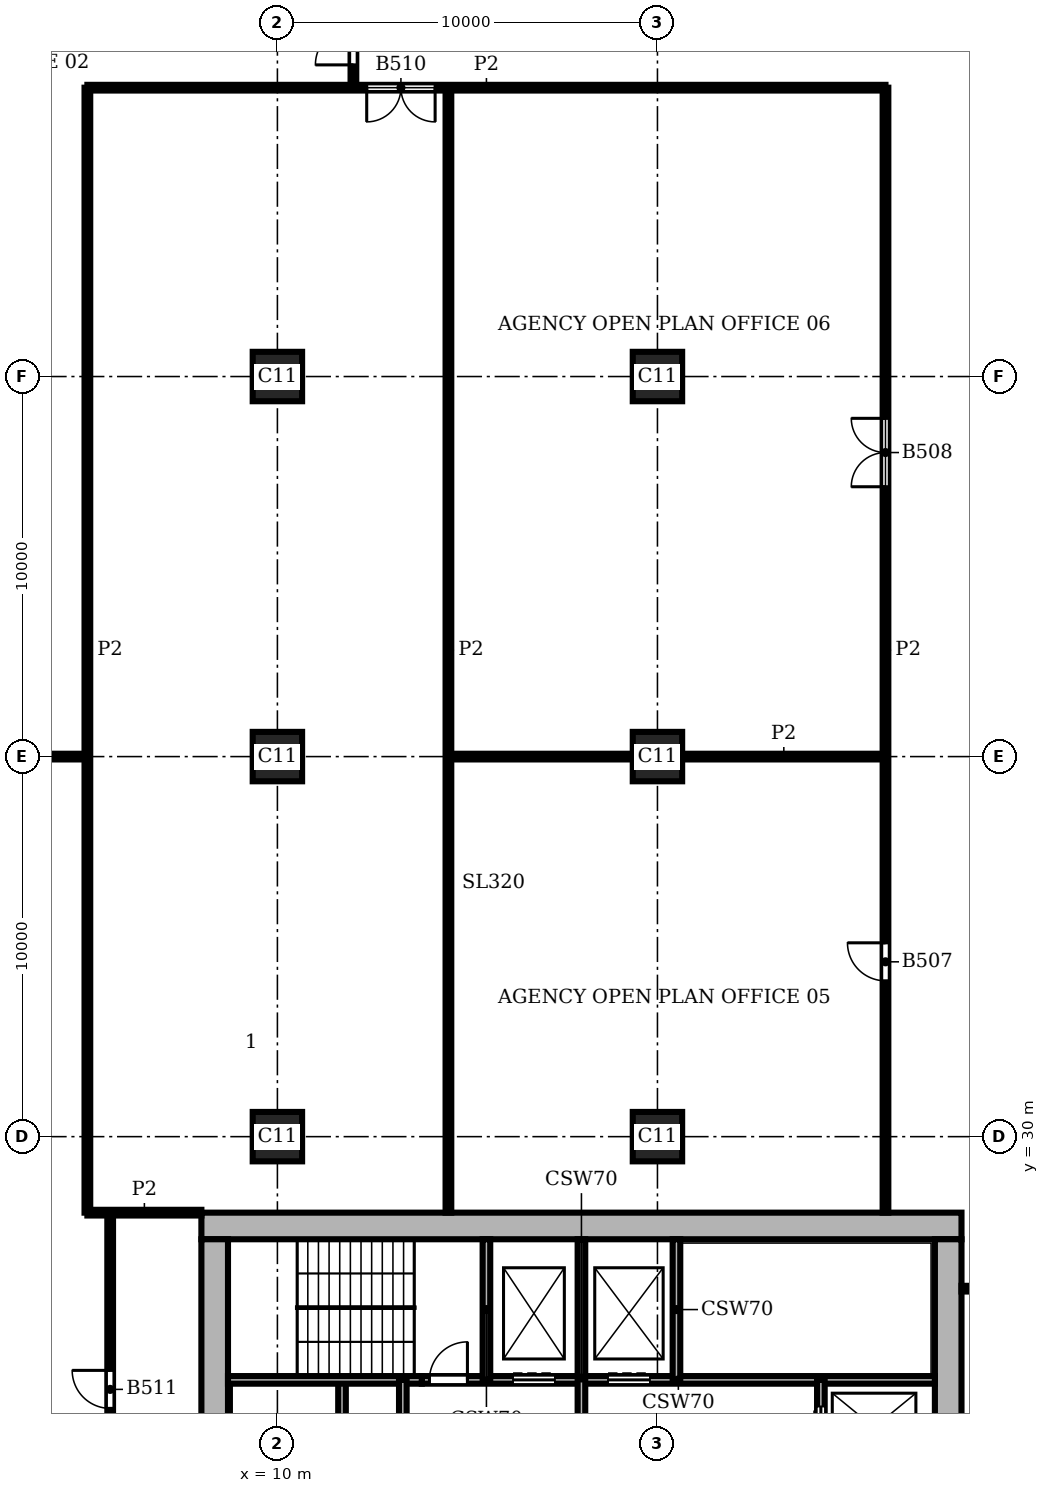
"""IFC4 building model, lengths in metres.
Left out: names, types, materials, properties, quantities, classifications, styles, units other than length and angle.
Written with IfcOpenShell. Run it as: python <this file> out.ifc"""

import sys

from ifc_helpers import new_model, si_unit, direction, frame, frame_2d, origin, origin_2d, place, context, subcontext, project, spatial, rectangle, extrude, element, fill, save


model = new_model("IFC4")
c1 = context("Model", 3, precision=1e-05, world=origin(), true_north=direction((0.0, 1.0)))
c2 = subcontext(c1, "Body", "Model", "MODEL_VIEW")
j1 = project(units=[si_unit("LENGTHUNIT", "METRE"), si_unit("PLANEANGLEUNIT", "RADIAN")], contexts=[c1])
p1 = place(None, origin())
s1 = spatial("IfcSite", under=j1, at=p1, CompositionType="ELEMENT")
p2 = place(p1, origin())
s2 = spatial("IfcBuilding", under=s1, at=p2, CompositionType="ELEMENT")
p3 = place(p2, frame((0.0, 0.0, 178.5)))
s3 = spatial("IfcBuildingStorey", under=s2, at=p3, CompositionType="ELEMENT", Elevation=178.5)
for number, where, z_axis, x_axis in (
    (1, (10.0, 30.0, 0.0), (0.0, 0.0, 1.0), (1.0, 0.0, 0.0)),
    (2, (10.0, 40.0, 0.0), (0.0, 0.0, 1.0), (1.0, 0.0, 0.0)),
    (3, (10.0, 50.0, 0.0), (0.0, 0.0, 1.0), (1.0, 0.0, 0.0)),
    (4, (20.0, 30.0, 0.0), (0.0, 0.0, 1.0), (1.0, 0.0, 0.0)),
    (5, (20.0, 40.0, 0.0), (0.0, 0.0, 1.0), (1.0, 0.0, 0.0)),
    (6, (20.0, 50.0, 0.0), (0.0, 0.0, 1.0), (1.0, 0.0, 0.0)),
):
    element("IfcColumn", number, at=place(p3, frame(where, z_axis=z_axis, x_axis=x_axis)), inside=s3, PredefinedType="COLUMN", context=c2, shape_type="SweptSolid", body=[
        extrude(rectangle(XDim=1.3, YDim=1.3, at=origin_2d()), origin(), (0.0, 0.0, 1.0), 3.9),
    ])
p4 = place(p3, frame((27.65, 8.7, 0.0), z_axis=(0.0, 0.0, 1.0), x_axis=(0.0, 1.0, 0.0)))
e7 = element("IfcWall", 7, at=p4, inside=s3, PredefinedType="SHEAR", context=c2, shape_type="SweptSolid", body=[
    extrude(rectangle(XDim=18.6, YDim=0.7, at=frame_2d((9.3, 0.0))), origin(), (0.0, 0.0, 1.0), 3.9),
])
p5 = place(p4, frame((4.75, 0.0, 0.0)))
e8 = element("IfcOpeningElement", 8, at=p5, cuts=e7, PredefinedType="OPENING", context=c2, shape_type="SweptSolid", body=[
    extrude(rectangle(XDim=1.6, YDim=2.1, at=frame_2d((0.8, 1.05))), frame((0.0, 0.36, 0.0), z_axis=(0.0, -1.0, 0.0), x_axis=(1.0, 0.0, 0.0)), (0.0, 0.0, 1.0), 0.72),
])
p6 = place(p3, frame((28.0, 27.65, 0.0), z_axis=(0.0, 0.0, 1.0), x_axis=(-1.0, 0.0, 0.0)))
e9 = element("IfcWall", 9, at=p6, inside=s3, PredefinedType="SHEAR", context=c2, shape_type="SweptSolid", body=[
    extrude(rectangle(XDim=20.0, YDim=0.7, at=frame_2d((10.0, 0.0))), origin(), (0.0, 0.0, 1.0), 3.9),
])
p7 = place(p3, frame((8.35, 27.3, 0.0), z_axis=(0.0, 0.0, 1.0), x_axis=(0.0, -1.0, 0.0)))
e10 = element("IfcWall", 10, at=p7, inside=s3, PredefinedType="SHEAR", context=c2, shape_type="SweptSolid", body=[
    extrude(rectangle(XDim=18.6, YDim=0.7, at=frame_2d((9.3, 0.0))), origin(), (0.0, 0.0, 1.0), 3.9),
])
p8 = place(p3, frame((8.7, 23.6, 0.0), z_axis=(0.0, 0.0, 1.0), x_axis=(1.0, 0.0, 0.0)))
e11 = element("IfcWall", 11, at=p8, inside=s3, PredefinedType="SHEAR", context=c2, shape_type="SweptSolid", body=[
    extrude(rectangle(XDim=5.1, YDim=0.2, at=frame_2d((2.55, 0.0))), origin(), (0.0, 0.0, 1.0), 3.58),
])
p9 = place(p3, frame((13.8, 23.6, 0.0), z_axis=(0.0, 0.0, 1.0), x_axis=(1.0, 0.0, 0.0)))
e12 = element("IfcWall", 12, at=p9, inside=s3, PredefinedType="SHEAR", context=c2, shape_type="SweptSolid", body=[
    extrude(rectangle(XDim=13.5, YDim=0.2, at=frame_2d((6.75, 0.0))), origin(), (0.0, 0.0, 1.0), 3.58),
])
p10 = place(p9, frame((2.4, 0.0, 0.0)))
e13 = element("IfcOpeningElement", 13, at=p10, cuts=e12, PredefinedType="OPENING", context=c2, shape_type="SweptSolid", body=[
    extrude(rectangle(XDim=1.1, YDim=2.1, at=frame_2d((0.55, 1.05))), frame((0.0, 0.11, 0.0), z_axis=(0.0, -1.0, 0.0), x_axis=(1.0, 0.0, 0.0)), (0.0, 0.0, 1.0), 0.22),
])
p11 = place(p9, frame((4.9, 0.0, 0.0)))
e14 = element("IfcOpeningElement", 14, at=p11, cuts=e12, PredefinedType="OPENING", context=c2, shape_type="SweptSolid", body=[
    extrude(rectangle(XDim=1.1, YDim=2.1, at=frame_2d((0.55, 1.05))), frame((0.0, 0.11, 0.0), z_axis=(0.0, -1.0, 0.0), x_axis=(1.0, 0.0, 0.0)), (0.0, 0.0, 1.0), 0.22),
])
p12 = place(p9, frame((0.2, 0.0, 0.0)))
e15 = element("IfcOpeningElement", 15, at=p12, cuts=e12, PredefinedType="OPENING", context=c2, shape_type="SweptSolid", body=[
    extrude(rectangle(XDim=1.0, YDim=2.1, at=frame_2d((0.5, 1.05))), frame((0.0, 0.11, 0.0), z_axis=(0.0, -1.0, 0.0), x_axis=(1.0, 0.0, 0.0)), (0.0, 0.0, 1.0), 0.22),
])
p13 = place(p3, frame((11.7, 12.4, 0.0), z_axis=(0.0, 0.0, 1.0), x_axis=(0.0, 1.0, 0.0)))
e16 = element("IfcWall", 16, at=p13, inside=s3, PredefinedType="SHEAR", context=c2, shape_type="SweptSolid", body=[
    extrude(rectangle(XDim=11.2, YDim=0.2, at=frame_2d((5.6, 0.0))), origin(), (0.0, 0.0, 1.0), 3.58),
])
p14 = place(p13, frame((0.7, 0.0, 0.0)))
e17 = element("IfcOpeningElement", 17, at=p14, cuts=e16, PredefinedType="OPENING", context=c2, shape_type="SweptSolid", body=[
    extrude(rectangle(XDim=1.1, YDim=2.1, at=frame_2d((0.55, 1.05))), frame((0.0, 0.11, 0.0), z_axis=(0.0, -1.0, 0.0), x_axis=(1.0, 0.0, 0.0)), (0.0, 0.0, 1.0), 0.22),
])
p15 = place(p13, frame((3.2, 0.0, 0.0)))
e18 = element("IfcOpeningElement", 18, at=p15, cuts=e16, PredefinedType="OPENING", context=c2, shape_type="SweptSolid", body=[
    extrude(rectangle(XDim=1.1, YDim=2.1, at=frame_2d((0.55, 1.05))), frame((0.0, 0.11, 0.0), z_axis=(0.0, -1.0, 0.0), x_axis=(1.0, 0.0, 0.0)), (0.0, 0.0, 1.0), 0.22),
])
p16 = place(p13, frame((5.7, 0.0, 0.0)))
e19 = element("IfcOpeningElement", 19, at=p16, cuts=e16, PredefinedType="OPENING", context=c2, shape_type="SweptSolid", body=[
    extrude(rectangle(XDim=1.1, YDim=2.1, at=frame_2d((0.55, 1.05))), frame((0.0, 0.11, 0.0), z_axis=(0.0, -1.0, 0.0), x_axis=(1.0, 0.0, 0.0)), (0.0, 0.0, 1.0), 0.22),
])
p17 = place(p13, frame((8.2, 0.0, 0.0)))
e20 = element("IfcOpeningElement", 20, at=p17, cuts=e16, PredefinedType="OPENING", context=c2, shape_type="SweptSolid", body=[
    extrude(rectangle(XDim=1.1, YDim=2.1, at=frame_2d((0.55, 1.05))), frame((0.0, 0.11, 0.0), z_axis=(0.0, -1.0, 0.0), x_axis=(1.0, 0.0, 0.0)), (0.0, 0.0, 1.0), 0.22),
])
p18 = place(p3, frame((13.3, 20.0, 0.0), z_axis=(0.0, 0.0, 1.0), x_axis=(0.0, 1.0, 0.0)))
e21 = element("IfcWall", 21, at=p18, inside=s3, PredefinedType="SHEAR", context=c2, shape_type="SweptSolid", body=[
    extrude(rectangle(XDim=3.6, YDim=0.2, at=frame_2d((1.8, 0.0))), origin(), (0.0, 0.0, 1.0), 3.58),
])
p19 = place(p3, frame((15.5, 23.6, 0.0), z_axis=(0.0, 0.0, 1.0), x_axis=(0.0, 1.0, 0.0)))
e22 = element("IfcWall", 22, at=p19, inside=s3, PredefinedType="SHEAR", context=c2, shape_type="SweptSolid", body=[
    extrude(rectangle(XDim=3.7, YDim=0.2, at=frame_2d((1.85, 0.0))), origin(), (0.0, 0.0, 1.0), 3.58),
])
p20 = place(p3, frame((18.0, 20.0, 0.0), z_axis=(0.0, 0.0, 1.0), x_axis=(0.0, 1.0, 0.0)))
e23 = element("IfcWall", 23, at=p20, inside=s3, PredefinedType="SHEAR", context=c2, shape_type="SweptSolid", body=[
    extrude(rectangle(XDim=7.3, YDim=0.2, at=frame_2d((3.65, 0.0))), origin(), (0.0, 0.0, 1.0), 3.58),
])
p21 = place(p20, frame((1.2, 0.0, 0.0)))
e24 = element("IfcOpeningElement", 24, at=p21, cuts=e23, PredefinedType="OPENING", context=c2, shape_type="SweptSolid", body=[
    extrude(rectangle(XDim=1.2, YDim=2.1, at=frame_2d((0.6, 1.05))), frame((0.0, 0.11, 0.0), z_axis=(0.0, -1.0, 0.0), x_axis=(1.0, 0.0, 0.0)), (0.0, 0.0, 1.0), 0.22),
])
p22 = place(p3, frame((20.5, 23.6, 0.0), z_axis=(0.0, 0.0, 1.0), x_axis=(0.0, 1.0, 0.0)))
e25 = element("IfcWall", 25, at=p22, inside=s3, PredefinedType="SHEAR", context=c2, shape_type="SweptSolid", body=[
    extrude(rectangle(XDim=3.7, YDim=0.2, at=frame_2d((1.85, 0.0))), origin(), (0.0, 0.0, 1.0), 3.58),
])
p23 = place(p3, frame((24.3, 16.1, 0.0), z_axis=(0.0, 0.0, 1.0), x_axis=(0.0, 1.0, 0.0)))
e26 = element("IfcWall", 26, at=p23, inside=s3, PredefinedType="SHEAR", context=c2, shape_type="SweptSolid", body=[
    extrude(rectangle(XDim=7.5, YDim=0.2, at=frame_2d((3.75, 0.0))), origin(), (0.0, 0.0, 1.0), 3.58),
])
p24 = place(p23, frame((5.7, 0.0, 0.0)))
e27 = element("IfcOpeningElement", 27, at=p24, cuts=e26, PredefinedType="OPENING", context=c2, shape_type="SweptSolid", body=[
    extrude(rectangle(XDim=1.1, YDim=2.1, at=frame_2d((0.55, 1.05))), frame((0.0, 0.11, 0.0), z_axis=(0.0, -1.0, 0.0), x_axis=(1.0, 0.0, 0.0)), (0.0, 0.0, 1.0), 0.22),
])
p25 = place(p3, frame((5.0, 28.0, 0.0), z_axis=(0.0, 0.0, 1.0), x_axis=(0.0, 1.0, 0.0)))
e28 = element("IfcWall", 28, at=p25, inside=s3, PredefinedType="PARTITIONING", context=c2, shape_type="SweptSolid", body=[
    extrude(rectangle(XDim=29.6, YDim=0.15, at=frame_2d((14.8, 0.0))), origin(), (0.0, 0.0, 1.0), 3.58),
])
p26 = place(p3, frame((5.6, 5.6, 0.0), z_axis=(0.0, 0.0, 1.0), x_axis=(0.0, 1.0, 0.0)))
e29 = element("IfcWall", 29, at=p26, inside=s3, PredefinedType="PARTITIONING", context=c2, shape_type="SweptSolid", body=[
    extrude(rectangle(XDim=22.4, YDim=0.15, at=frame_2d((11.2, 0.0))), origin(), (0.0, 0.0, 1.0), 3.58),
])
p27 = place(p26, frame((3.85, 0.0, 0.0)))
e30 = element("IfcOpeningElement", 30, at=p27, cuts=e29, PredefinedType="OPENING", context=c2, shape_type="SweptSolid", body=[
    extrude(rectangle(XDim=1.0, YDim=2.1, at=frame_2d((0.5, 1.05))), frame((0.0, 0.085, 0.0), z_axis=(0.0, -1.0, 0.0), x_axis=(1.0, 0.0, 0.0)), (0.0, 0.0, 1.0), 0.17),
])
p28 = place(p26, frame((11.5, 0.0, 0.0)))
e31 = element("IfcOpeningElement", 31, at=p28, cuts=e29, PredefinedType="OPENING", context=c2, shape_type="SweptSolid", body=[
    extrude(rectangle(XDim=0.8, YDim=2.1, at=frame_2d((0.4, 1.05))), frame((0.0, 0.085, 0.0), z_axis=(0.0, -1.0, 0.0), x_axis=(1.0, 0.0, 0.0)), (0.0, 0.0, 1.0), 0.17),
])
p29 = place(p26, frame((17.25, 0.0, 0.0)))
e32 = element("IfcOpeningElement", 32, at=p29, cuts=e29, PredefinedType="OPENING", context=c2, shape_type="SweptSolid", body=[
    extrude(rectangle(XDim=1.0, YDim=2.1, at=frame_2d((0.5, 1.05))), frame((0.0, 0.085, 0.0), z_axis=(0.0, -1.0, 0.0), x_axis=(1.0, 0.0, 0.0)), (0.0, 0.0, 1.0), 0.17),
])
p30 = place(p3, frame((12.0, 57.6, 0.0), z_axis=(0.0, 0.0, 1.0), x_axis=(0.0, 1.0, 0.0)))
e33 = element("IfcWall", 33, at=p30, inside=s3, PredefinedType="PARTITIONING", context=c2, shape_type="SweptSolid", body=[
    extrude(rectangle(XDim=2.4, YDim=0.15, at=frame_2d((1.2, 0.0))), origin(), (0.0, 0.0, 1.0), 3.58),
])
p31 = place(p30, frame((0.6, 0.0, 0.0)))
e34 = element("IfcOpeningElement", 34, at=p31, cuts=e33, PredefinedType="OPENING", context=c2, shape_type="SweptSolid", body=[
    extrude(rectangle(XDim=1.0, YDim=2.1, at=frame_2d((0.5, 1.05))), frame((0.0, 0.085, 0.0), z_axis=(0.0, -1.0, 0.0), x_axis=(1.0, 0.0, 0.0)), (0.0, 0.0, 1.0), 0.17),
])
p32 = place(p3, frame((14.5, 28.0, 0.0), z_axis=(0.0, 0.0, 1.0), x_axis=(0.0, 1.0, 0.0)))
e35 = element("IfcWall", 35, at=p32, inside=s3, PredefinedType="PARTITIONING", context=c2, shape_type="SweptSolid", body=[
    extrude(rectangle(XDim=29.6, YDim=0.15, at=frame_2d((14.8, 0.0))), origin(), (0.0, 0.0, 1.0), 3.58),
])
p33 = place(p3, frame((26.0, 28.0, 0.0), z_axis=(0.0, 0.0, 1.0), x_axis=(0.0, 1.0, 0.0)))
e36 = element("IfcWall", 36, at=p33, inside=s3, PredefinedType="PARTITIONING", context=c2, shape_type="SweptSolid", body=[
    extrude(rectangle(XDim=29.6, YDim=0.15, at=frame_2d((14.8, 0.0))), origin(), (0.0, 0.0, 1.0), 3.58),
])
p34 = place(p33, frame((6.1, 0.0, 0.0)))
e37 = element("IfcOpeningElement", 37, at=p34, cuts=e36, PredefinedType="OPENING", context=c2, shape_type="SweptSolid", body=[
    extrude(rectangle(XDim=1.0, YDim=2.1, at=frame_2d((0.5, 1.05))), frame((0.0, 0.085, 0.0), z_axis=(0.0, -1.0, 0.0), x_axis=(1.0, 0.0, 0.0)), (0.0, 0.0, 1.0), 0.17),
])
p35 = place(p33, frame((19.1, 0.0, 0.0)))
e38 = element("IfcOpeningElement", 38, at=p35, cuts=e36, PredefinedType="OPENING", context=c2, shape_type="SweptSolid", body=[
    extrude(rectangle(XDim=1.8, YDim=2.1, at=frame_2d((0.9, 1.05))), frame((0.0, 0.085, 0.0), z_axis=(0.0, -1.0, 0.0), x_axis=(1.0, 0.0, 0.0)), (0.0, 0.0, 1.0), 0.17),
])
p36 = place(p3, frame((28.0, 26.0, 0.0), z_axis=(0.0, 0.0, 1.0), x_axis=(1.0, 0.0, 0.0)))
e39 = element("IfcWall", 39, at=p36, inside=s3, PredefinedType="PARTITIONING", context=c2, shape_type="SweptSolid", body=[
    extrude(rectangle(XDim=2.8, YDim=0.15, at=frame_2d((1.4, 0.0))), origin(), (0.0, 0.0, 1.0), 3.58),
])
p37 = place(p3, frame((5.0, 28.0, 0.0), z_axis=(0.0, 0.0, 1.0), x_axis=(1.0, 0.0, 0.0)))
e40 = element("IfcWall", 40, at=p37, inside=s3, PredefinedType="PARTITIONING", context=c2, shape_type="SweptSolid", body=[
    extrude(rectangle(XDim=3.0, YDim=0.15, at=frame_2d((1.5, 0.0))), origin(), (0.0, 0.0, 1.0), 3.58),
])
p38 = place(p3, frame((0.45, 40.0, 0.0), z_axis=(0.0, 0.0, 1.0), x_axis=(1.0, 0.0, 0.0)))
e41 = element("IfcWall", 41, at=p38, inside=s3, PredefinedType="PARTITIONING", context=c2, shape_type="SweptSolid", body=[
    extrude(rectangle(XDim=4.55, YDim=0.15, at=frame_2d((2.275, 0.0))), origin(), (0.0, 0.0, 1.0), 3.58),
])
p39 = place(p3, frame((14.5, 40.0, 0.0), z_axis=(0.0, 0.0, 1.0), x_axis=(1.0, 0.0, 0.0)))
e42 = element("IfcWall", 42, at=p39, inside=s3, PredefinedType="PARTITIONING", context=c2, shape_type="SweptSolid", body=[
    extrude(rectangle(XDim=4.85, YDim=0.15, at=frame_2d((2.425, 0.0))), origin(), (0.0, 0.0, 1.0), 3.58),
])
p40 = place(p3, frame((20.65, 40.0, 0.0), z_axis=(0.0, 0.0, 1.0), x_axis=(1.0, 0.0, 0.0)))
e43 = element("IfcWall", 43, at=p40, inside=s3, PredefinedType="PARTITIONING", context=c2, shape_type="SweptSolid", body=[
    extrude(rectangle(XDim=5.35, YDim=0.15, at=frame_2d((2.675, 0.0))), origin(), (0.0, 0.0, 1.0), 3.58),
])
p41 = place(p3, frame((5.0, 57.6, 0.0), z_axis=(0.0, 0.0, 1.0), x_axis=(1.0, 0.0, 0.0)))
e44 = element("IfcWall", 44, at=p41, inside=s3, PredefinedType="PARTITIONING", context=c2, shape_type="SweptSolid", body=[
    extrude(rectangle(XDim=21.0, YDim=0.15, at=frame_2d((10.5, 0.0))), origin(), (0.0, 0.0, 1.0), 3.58),
])
p42 = place(p41, frame((7.35, 0.0, 0.0)))
e45 = element("IfcOpeningElement", 45, at=p42, cuts=e44, PredefinedType="OPENING", context=c2, shape_type="SweptSolid", body=[
    extrude(rectangle(XDim=1.8, YDim=2.1, at=frame_2d((0.9, 1.05))), frame((0.0, 0.085, 0.0), z_axis=(0.0, -1.0, 0.0), x_axis=(1.0, 0.0, 0.0)), (0.0, 0.0, 1.0), 0.17),
])
p43 = place(p24, origin())
e46 = element("IfcDoor", 46, at=p43, inside=s3, OperationType="DOUBLE_DOOR_SLIDING", PredefinedType="DOOR", context=c2, shape_type="SweptSolid", body=[
    extrude(rectangle(XDim=1.1, YDim=2.1, at=frame_2d((0.55, 1.05))), frame((0.0, 0.025, 0.0), z_axis=(0.0, -1.0, 0.0), x_axis=(1.0, 0.0, 0.0)), (0.0, 0.0, 1.0), 0.05),
])
fill(e27, e46)
p44 = place(p10, origin())
e47 = element("IfcDoor", 47, at=p44, inside=s3, OperationType="DOUBLE_DOOR_SLIDING", PredefinedType="DOOR", context=c2, shape_type="SweptSolid", body=[
    extrude(rectangle(XDim=1.1, YDim=2.1, at=frame_2d((0.55, 1.05))), frame((0.0, 0.025, 0.0), z_axis=(0.0, -1.0, 0.0), x_axis=(1.0, 0.0, 0.0)), (0.0, 0.0, 1.0), 0.05),
])
fill(e13, e47)
p45 = place(p11, origin())
e48 = element("IfcDoor", 48, at=p45, inside=s3, OperationType="DOUBLE_DOOR_SLIDING", PredefinedType="DOOR", context=c2, shape_type="SweptSolid", body=[
    extrude(rectangle(XDim=1.1, YDim=2.1, at=frame_2d((0.55, 1.05))), frame((0.0, 0.025, 0.0), z_axis=(0.0, -1.0, 0.0), x_axis=(1.0, 0.0, 0.0)), (0.0, 0.0, 1.0), 0.05),
])
fill(e14, e48)
p46 = place(p12, origin())
e49 = element("IfcDoor", 49, at=p46, inside=s3, OperationType="SINGLE_SWING_RIGHT", PredefinedType="DOOR", context=c2, shape_type="SweptSolid", body=[
    extrude(rectangle(XDim=1.0, YDim=2.1, at=frame_2d((0.5, 1.05))), frame((0.0, 0.025, 0.0), z_axis=(0.0, -1.0, 0.0), x_axis=(1.0, 0.0, 0.0)), (0.0, 0.0, 1.0), 0.05),
])
fill(e15, e49)
p47 = place(p34, origin())
e50 = element("IfcDoor", 50, at=p47, inside=s3, OperationType="SINGLE_SWING_RIGHT", PredefinedType="DOOR", context=c2, shape_type="SweptSolid", body=[
    extrude(rectangle(XDim=1.0, YDim=2.1, at=frame_2d((0.5, 1.05))), frame((0.0, 0.025, 0.0), z_axis=(0.0, -1.0, 0.0), x_axis=(1.0, 0.0, 0.0)), (0.0, 0.0, 1.0), 0.05),
])
fill(e37, e50)
p48 = place(p35, origin())
e51 = element("IfcDoor", 51, at=p48, inside=s3, OperationType="DOUBLE_DOOR_SINGLE_SWING", PredefinedType="DOOR", context=c2, shape_type="SweptSolid", body=[
    extrude(rectangle(XDim=1.8, YDim=2.1, at=frame_2d((0.9, 1.05))), frame((0.0, 0.025, 0.0), z_axis=(0.0, -1.0, 0.0), x_axis=(1.0, 0.0, 0.0)), (0.0, 0.0, 1.0), 0.05),
])
fill(e38, e51)
p49 = place(p42, frame((1.8, 0.0, 0.0), z_axis=(0.0, 0.0, 1.0), x_axis=(-1.0, 0.0, 0.0)))
e52 = element("IfcDoor", 52, at=p49, inside=s3, OperationType="DOUBLE_DOOR_SINGLE_SWING", PredefinedType="DOOR", context=c2, shape_type="SweptSolid", body=[
    extrude(rectangle(XDim=1.8, YDim=2.1, at=frame_2d((0.9, 1.05))), frame((0.0, 0.025, 0.0), z_axis=(0.0, -1.0, 0.0), x_axis=(1.0, 0.0, 0.0)), (0.0, 0.0, 1.0), 0.05),
])
fill(e45, e52)
p50 = place(p29, origin())
e53 = element("IfcDoor", 53, at=p50, inside=s3, OperationType="SINGLE_SWING_RIGHT", PredefinedType="DOOR", context=c2, shape_type="SweptSolid", body=[
    extrude(rectangle(XDim=1.0, YDim=2.1, at=frame_2d((0.5, 1.05))), frame((0.0, 0.025, 0.0), z_axis=(0.0, -1.0, 0.0), x_axis=(1.0, 0.0, 0.0)), (0.0, 0.0, 1.0), 0.05),
])
fill(e32, e53)
p51 = place(p31, origin())
e54 = element("IfcDoor", 54, at=p51, inside=s3, OperationType="SINGLE_SWING_LEFT", PredefinedType="DOOR", context=c2, shape_type="SweptSolid", body=[
    extrude(rectangle(XDim=1.0, YDim=2.1, at=frame_2d((0.5, 1.05))), frame((0.0, 0.025, 0.0), z_axis=(0.0, -1.0, 0.0), x_axis=(1.0, 0.0, 0.0)), (0.0, 0.0, 1.0), 0.05),
])
fill(e34, e54)
save(model, sys.argv[1])
